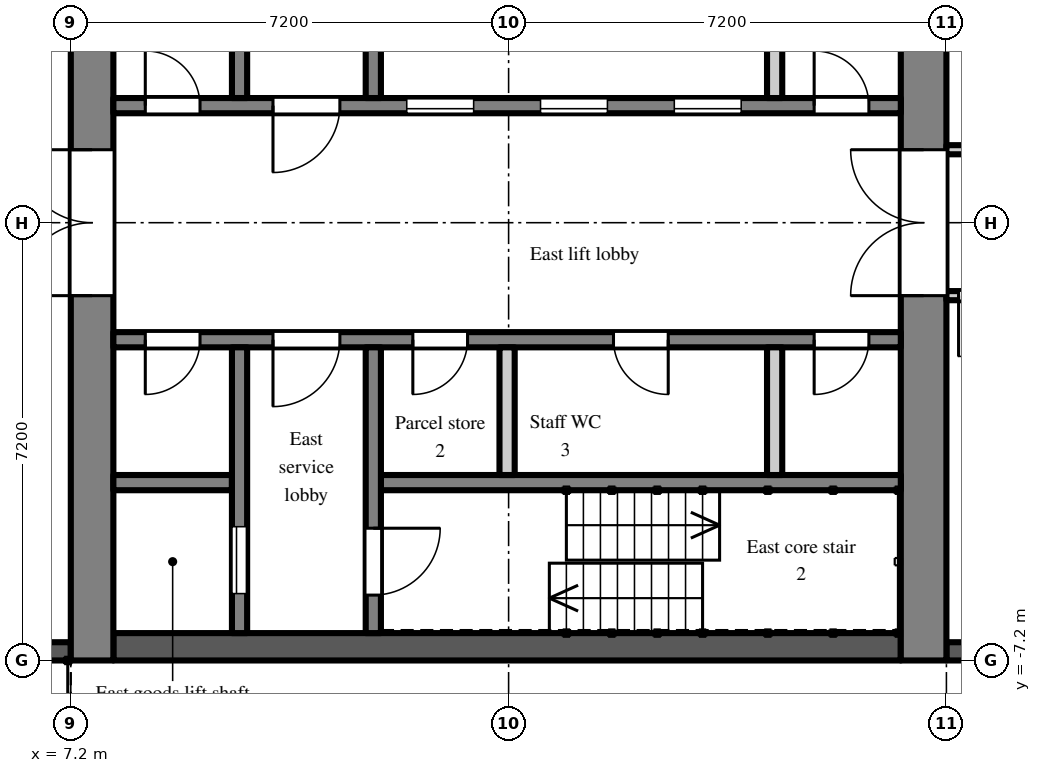
"""IFC4 building model, lengths in metres.
Left out: names, types, materials, properties, quantities, classifications, styles, units other than length and angle.
Written with IfcOpenShell. Run it as: python <this file> out.ifc"""

import sys

from ifc_helpers import new_model, si_unit, direction, frame, frame_2d, origin, place, context, subcontext, project, spatial, rectangle, extrude, element, fill, save


model = new_model("IFC4")
c1 = context("Model", 3, precision=1e-05, world=origin(), true_north=direction((0.0, 1.0)))
c2 = subcontext(c1, "Body", "Model", "MODEL_VIEW")
j1 = project(units=[si_unit("LENGTHUNIT", "METRE"), si_unit("PLANEANGLEUNIT", "RADIAN")], contexts=[c1])
p1 = place(None, origin())
s1 = spatial("IfcSite", under=j1, at=p1, CompositionType="ELEMENT")
p2 = place(p1, origin())
s2 = spatial("IfcBuilding", under=s1, at=p2, CompositionType="ELEMENT")
p3 = place(p2, frame((0.0, 0.0, 147.3)))
s3 = spatial("IfcBuildingStorey", under=s2, at=p3, CompositionType="ELEMENT", Elevation=147.3)
p4 = place(p3, frame((21.6, -7.05, 0.0), z_axis=(0.0, 0.0, 1.0), x_axis=(1.0, 0.0, 0.0)))
e1 = element("IfcWall", 1, at=p4, inside=s3, PredefinedType="SOLIDWALL", context=c2, shape_type="SweptSolid", body=[
    extrude(rectangle(XDim=2.7, YDim=0.3, at=frame_2d((1.35, 0.0))), origin(), (0.0, 0.0, 1.0), 2.2),
])
p5 = place(p4, frame((0.75, 0.0, 0.2)))
e2 = element("IfcOpeningElement", 2, at=p5, cuts=e1, PredefinedType="OPENING", context=c2, shape_type="SweptSolid", body=[
    extrude(rectangle(XDim=1.2, YDim=1.85, at=frame_2d((0.6, 0.925))), frame((0.0, 0.16, 0.0), z_axis=(0.0, -1.0, 0.0), x_axis=(1.0, 0.0, 0.0)), (0.0, 0.0, 1.0), 0.32),
])
p6 = place(p3, frame((4.2, -7.05, 0.0), z_axis=(0.0, 0.0, 1.0), x_axis=(1.0, 0.0, 0.0)))
e3 = element("IfcWall", 3, at=p6, inside=s3, PredefinedType="SOLIDWALL", context=c2, shape_type="SweptSolid", body=[
    extrude(rectangle(XDim=3.0, YDim=0.3, at=frame_2d((1.5, 0.0))), origin(), (0.0, 0.0, 1.0), 2.2),
])
p7 = place(p3, frame((7.55, -7.2, 0.0), z_axis=(0.0, 0.0, 1.0), x_axis=(0.0, 1.0, 0.0)))
e4 = element("IfcWall", 4, at=p7, inside=s3, PredefinedType="SHEAR", context=c2, shape_type="SweptSolid", body=[
    extrude(rectangle(XDim=14.4, YDim=0.7, at=frame_2d((7.2, 0.0))), origin(), (0.0, 0.0, 1.0), 2.6),
])
p8 = place(p7, frame((6.0, 0.0, 0.0)))
e5 = element("IfcOpeningElement", 5, at=p8, cuts=e4, PredefinedType="OPENING", context=c2, shape_type="SweptSolid", body=[
    extrude(rectangle(XDim=2.4, YDim=2.2, at=frame_2d((1.2, 1.1))), frame((0.0, 0.36, 0.0), z_axis=(0.0, -1.0, 0.0), x_axis=(1.0, 0.0, 0.0)), (0.0, 0.0, 1.0), 0.72),
])
p9 = place(p3, frame((21.225, -7.2, 0.0), z_axis=(0.0, 0.0, 1.0), x_axis=(0.0, 1.0, 0.0)))
e6 = element("IfcWall", 6, at=p9, inside=s3, PredefinedType="SHEAR", context=c2, shape_type="SweptSolid", body=[
    extrude(rectangle(XDim=14.4, YDim=0.75, at=frame_2d((7.2, 0.0))), origin(), (0.0, 0.0, 1.0), 2.6),
])
p10 = place(p9, frame((6.0, 0.0, 0.0)))
e7 = element("IfcOpeningElement", 7, at=p10, cuts=e6, PredefinedType="OPENING", context=c2, shape_type="SweptSolid", body=[
    extrude(rectangle(XDim=2.4, YDim=2.2, at=frame_2d((1.2, 1.1))), frame((0.0, 0.385, 0.0), z_axis=(0.0, -1.0, 0.0), x_axis=(1.0, 0.0, 0.0)), (0.0, 0.0, 1.0), 0.77),
])
p11 = place(p3, frame((7.9, 1.925, 0.0), z_axis=(0.0, 0.0, 1.0), x_axis=(1.0, 0.0, 0.0)))
e8 = element("IfcWall", 8, at=p11, inside=s3, PredefinedType="SHEAR", context=c2, shape_type="SweptSolid", body=[
    extrude(rectangle(XDim=12.95, YDim=0.25, at=frame_2d((6.475, 0.0))), origin(), (0.0, 0.0, 1.0), 2.6),
])
p12 = place(p11, frame((4.825, 0.0, 0.0)))
e9 = element("IfcOpeningElement", 9, at=p12, cuts=e8, PredefinedType="OPENING", context=c2, shape_type="SweptSolid", body=[
    extrude(rectangle(XDim=1.1, YDim=2.1, at=frame_2d((0.55, 1.05))), frame((0.0, 0.135, 0.0), z_axis=(0.0, -1.0, 0.0), x_axis=(1.0, 0.0, 0.0)), (0.0, 0.0, 1.0), 0.27),
])
p13 = place(p11, frame((7.025, 0.0, 0.0)))
e10 = element("IfcOpeningElement", 10, at=p13, cuts=e8, PredefinedType="OPENING", context=c2, shape_type="SweptSolid", body=[
    extrude(rectangle(XDim=1.1, YDim=2.1, at=frame_2d((0.55, 1.05))), frame((0.0, 0.135, 0.0), z_axis=(0.0, -1.0, 0.0), x_axis=(1.0, 0.0, 0.0)), (0.0, 0.0, 1.0), 0.27),
])
p14 = place(p11, frame((9.225, 0.0, 0.0)))
e11 = element("IfcOpeningElement", 11, at=p14, cuts=e8, PredefinedType="OPENING", context=c2, shape_type="SweptSolid", body=[
    extrude(rectangle(XDim=1.1, YDim=2.1, at=frame_2d((0.55, 1.05))), frame((0.0, 0.135, 0.0), z_axis=(0.0, -1.0, 0.0), x_axis=(1.0, 0.0, 0.0)), (0.0, 0.0, 1.0), 0.27),
])
p15 = place(p11, frame((0.525, 0.0, 0.0)))
e12 = element("IfcOpeningElement", 12, at=p15, cuts=e8, PredefinedType="OPENING", context=c2, shape_type="SweptSolid", body=[
    extrude(rectangle(XDim=0.9, YDim=2.1, at=frame_2d((0.45, 1.05))), frame((0.0, 0.135, 0.0), z_axis=(0.0, -1.0, 0.0), x_axis=(1.0, 0.0, 0.0)), (0.0, 0.0, 1.0), 0.27),
])
p16 = place(p11, frame((2.625, 0.0, 0.0)))
e13 = element("IfcOpeningElement", 13, at=p16, cuts=e8, PredefinedType="OPENING", context=c2, shape_type="SweptSolid", body=[
    extrude(rectangle(XDim=1.1, YDim=2.1, at=frame_2d((0.55, 1.05))), frame((0.0, 0.135, 0.0), z_axis=(0.0, -1.0, 0.0), x_axis=(1.0, 0.0, 0.0)), (0.0, 0.0, 1.0), 0.27),
])
p17 = place(p11, frame((11.525, 0.0, 0.0)))
e14 = element("IfcOpeningElement", 14, at=p17, cuts=e8, PredefinedType="OPENING", context=c2, shape_type="SweptSolid", body=[
    extrude(rectangle(XDim=0.9, YDim=2.1, at=frame_2d((0.45, 1.05))), frame((0.0, 0.135, 0.0), z_axis=(0.0, -1.0, 0.0), x_axis=(1.0, 0.0, 0.0)), (0.0, 0.0, 1.0), 0.27),
])
p18 = place(p3, frame((9.975, 2.05, 0.0), z_axis=(0.0, 0.0, 1.0), x_axis=(0.0, 1.0, 0.0)))
e15 = element("IfcWall", 15, at=p18, inside=s3, PredefinedType="SHEAR", context=c2, shape_type="SweptSolid", body=[
    extrude(rectangle(XDim=4.7, YDim=0.25, at=frame_2d((2.35, 0.0))), origin(), (0.0, 0.0, 1.0), 2.6),
])
p19 = place(p18, frame((2.95, 0.0, 0.0)))
e16 = element("IfcOpeningElement", 16, at=p19, cuts=e15, PredefinedType="OPENING", context=c2, shape_type="SweptSolid", body=[
    extrude(rectangle(XDim=1.1, YDim=2.1, at=frame_2d((0.55, 1.05))), frame((0.0, 0.135, 0.0), z_axis=(0.0, -1.0, 0.0), x_axis=(1.0, 0.0, 0.0)), (0.0, 0.0, 1.0), 0.27),
])
p20 = place(p3, frame((12.175, 2.05, 0.0), z_axis=(0.0, 0.0, 1.0), x_axis=(0.0, 1.0, 0.0)))
e17 = element("IfcWall", 17, at=p20, inside=s3, PredefinedType="SHEAR", context=c2, shape_type="SweptSolid", body=[
    extrude(rectangle(XDim=4.7, YDim=0.25, at=frame_2d((2.35, 0.0))), origin(), (0.0, 0.0, 1.0), 2.6),
])
p21 = place(p20, frame((2.975, 0.0, 0.0)))
e18 = element("IfcOpeningElement", 18, at=p21, cuts=e17, PredefinedType="OPENING", context=c2, shape_type="SweptSolid", body=[
    extrude(rectangle(XDim=1.1, YDim=2.1, at=frame_2d((0.55, 1.05))), frame((0.0, 0.135, 0.0), z_axis=(0.0, -1.0, 0.0), x_axis=(1.0, 0.0, 0.0)), (0.0, 0.0, 1.0), 0.27),
])
p22 = place(p3, frame((18.775, 2.05, 0.0), z_axis=(0.0, 0.0, 1.0), x_axis=(0.0, 1.0, 0.0)))
e19 = element("IfcWall", 19, at=p22, inside=s3, PredefinedType="PARTITIONING", context=c2, shape_type="SweptSolid", body=[
    extrude(rectangle(XDim=2.1, YDim=0.25, at=frame_2d((1.05, 0.0))), origin(), (0.0, 0.0, 1.0), 2.6),
])
p23 = place(p3, frame((7.9, -6.975, 0.0), z_axis=(0.0, 0.0, 1.0), x_axis=(1.0, 0.0, 0.0)))
e20 = element("IfcWall", 20, at=p23, inside=s3, PredefinedType="SHEAR", context=c2, shape_type="SweptSolid", body=[
    extrude(rectangle(XDim=12.95, YDim=0.45, at=frame_2d((6.475, 0.0))), origin(), (0.0, 0.0, 1.0), 2.6),
])
p24 = place(p3, frame((7.9, -1.925, 0.0), z_axis=(0.0, 0.0, 1.0), x_axis=(1.0, 0.0, 0.0)))
e21 = element("IfcWall", 21, at=p24, inside=s3, PredefinedType="SHEAR", context=c2, shape_type="SweptSolid", body=[
    extrude(rectangle(XDim=12.95, YDim=0.25, at=frame_2d((6.475, 0.0))), origin(), (0.0, 0.0, 1.0), 2.6),
])
p25 = place(p24, frame((0.525, 0.0, 0.0)))
e22 = element("IfcOpeningElement", 22, at=p25, cuts=e21, PredefinedType="OPENING", context=c2, shape_type="SweptSolid", body=[
    extrude(rectangle(XDim=0.9, YDim=2.1, at=frame_2d((0.45, 1.05))), frame((0.0, 0.135, 0.0), z_axis=(0.0, -1.0, 0.0), x_axis=(1.0, 0.0, 0.0)), (0.0, 0.0, 1.0), 0.27),
])
p26 = place(p24, frame((2.625, 0.0, 0.0)))
e23 = element("IfcOpeningElement", 23, at=p26, cuts=e21, PredefinedType="OPENING", context=c2, shape_type="SweptSolid", body=[
    extrude(rectangle(XDim=1.1, YDim=2.1, at=frame_2d((0.55, 1.05))), frame((0.0, 0.135, 0.0), z_axis=(0.0, -1.0, 0.0), x_axis=(1.0, 0.0, 0.0)), (0.0, 0.0, 1.0), 0.27),
])
p27 = place(p24, frame((4.925, 0.0, 0.0)))
e24 = element("IfcOpeningElement", 24, at=p27, cuts=e21, PredefinedType="OPENING", context=c2, shape_type="SweptSolid", body=[
    extrude(rectangle(XDim=0.9, YDim=2.1, at=frame_2d((0.45, 1.05))), frame((0.0, 0.135, 0.0), z_axis=(0.0, -1.0, 0.0), x_axis=(1.0, 0.0, 0.0)), (0.0, 0.0, 1.0), 0.27),
])
p28 = place(p24, frame((8.225, 0.0, 0.0)))
e25 = element("IfcOpeningElement", 25, at=p28, cuts=e21, PredefinedType="OPENING", context=c2, shape_type="SweptSolid", body=[
    extrude(rectangle(XDim=0.9, YDim=2.1, at=frame_2d((0.45, 1.05))), frame((0.0, 0.135, 0.0), z_axis=(0.0, -1.0, 0.0), x_axis=(1.0, 0.0, 0.0)), (0.0, 0.0, 1.0), 0.27),
])
p29 = place(p24, frame((11.525, 0.0, 0.0)))
e26 = element("IfcOpeningElement", 26, at=p29, cuts=e21, PredefinedType="OPENING", context=c2, shape_type="SweptSolid", body=[
    extrude(rectangle(XDim=0.9, YDim=2.1, at=frame_2d((0.45, 1.05))), frame((0.0, 0.135, 0.0), z_axis=(0.0, -1.0, 0.0), x_axis=(1.0, 0.0, 0.0)), (0.0, 0.0, 1.0), 0.27),
])
p30 = place(p3, frame((7.9, -4.275, 0.0), z_axis=(0.0, 0.0, 1.0), x_axis=(1.0, 0.0, 0.0)))
e27 = element("IfcWall", 27, at=p30, inside=s3, PredefinedType="SHEAR", context=c2, shape_type="SweptSolid", body=[
    extrude(rectangle(XDim=1.95, YDim=0.25, at=frame_2d((0.975, 0.0))), origin(), (0.0, 0.0, 1.0), 2.6),
])
p31 = place(p3, frame((12.3, -4.275, 0.0), z_axis=(0.0, 0.0, 1.0), x_axis=(1.0, 0.0, 0.0)))
e28 = element("IfcWall", 28, at=p31, inside=s3, PredefinedType="SHEAR", context=c2, shape_type="SweptSolid", body=[
    extrude(rectangle(XDim=8.55, YDim=0.25, at=frame_2d((4.275, 0.0))), origin(), (0.0, 0.0, 1.0), 2.6),
])
p32 = place(p3, frame((9.975, -2.05, 0.0), z_axis=(0.0, 0.0, 1.0), x_axis=(0.0, -1.0, 0.0)))
e29 = element("IfcWall", 29, at=p32, inside=s3, PredefinedType="SHEAR", context=c2, shape_type="SweptSolid", body=[
    extrude(rectangle(XDim=4.7, YDim=0.25, at=frame_2d((2.35, 0.0))), origin(), (0.0, 0.0, 1.0), 2.6),
])
p33 = place(p32, frame((2.95, 0.0, 0.0)))
e30 = element("IfcOpeningElement", 30, at=p33, cuts=e29, PredefinedType="OPENING", context=c2, shape_type="SweptSolid", body=[
    extrude(rectangle(XDim=1.1, YDim=2.1, at=frame_2d((0.55, 1.05))), frame((0.0, 0.135, 0.0), z_axis=(0.0, -1.0, 0.0), x_axis=(1.0, 0.0, 0.0)), (0.0, 0.0, 1.0), 0.27),
])
p34 = place(p3, frame((12.175, -2.05, 0.0), z_axis=(0.0, 0.0, 1.0), x_axis=(0.0, -1.0, 0.0)))
e31 = element("IfcWall", 31, at=p34, inside=s3, PredefinedType="SHEAR", context=c2, shape_type="SweptSolid", body=[
    extrude(rectangle(XDim=4.7, YDim=0.25, at=frame_2d((2.35, 0.0))), origin(), (0.0, 0.0, 1.0), 2.6),
])
p35 = place(p34, frame((2.975, 0.0, 0.0)))
e32 = element("IfcOpeningElement", 32, at=p35, cuts=e31, PredefinedType="OPENING", context=c2, shape_type="SweptSolid", body=[
    extrude(rectangle(XDim=1.1, YDim=2.1, at=frame_2d((0.55, 1.05))), frame((0.0, 0.135, 0.0), z_axis=(0.0, -1.0, 0.0), x_axis=(1.0, 0.0, 0.0)), (0.0, 0.0, 1.0), 0.27),
])
for number, where, z_axis, x_axis in (
    (33, (14.375, -2.05, 0.0), (0.0, 0.0, 1.0), (0.0, -1.0, 0.0)),
    (34, (18.775, -2.05, 0.0), (0.0, 0.0, 1.0), (0.0, -1.0, 0.0)),
):
    element("IfcWall", number, at=place(p3, frame(where, z_axis=z_axis, x_axis=x_axis)), inside=s3, PredefinedType="PARTITIONING", context=c2, shape_type="SweptSolid", body=[
        extrude(rectangle(XDim=2.1, YDim=0.25, at=frame_2d((1.05, 0.0))), origin(), (0.0, 0.0, 1.0), 2.6),
    ])
p36 = place(p3, frame((21.6, -1.2, 0.0), z_axis=(0.0, 0.0, 1.0), x_axis=(1.0, 0.0, 0.0)))
e35 = element("IfcWall", 35, at=p36, inside=s3, PredefinedType="PARTITIONING", context=c2, shape_type="SweptSolid", body=[
    extrude(rectangle(XDim=14.9, YDim=0.15, at=frame_2d((7.45, 0.0))), origin(), (0.0, 0.0, 1.0), 2.6),
])
p37 = place(p36, frame((0.2, 0.0, 0.0)))
e36 = element("IfcOpeningElement", 36, at=p37, cuts=e35, PredefinedType="OPENING", context=c2, shape_type="SweptSolid", body=[
    extrude(rectangle(XDim=1.0, YDim=2.1, at=frame_2d((0.5, 1.05))), frame((0.0, 0.085, 0.0), z_axis=(0.0, -1.0, 0.0), x_axis=(1.0, 0.0, 0.0)), (0.0, 0.0, 1.0), 0.17),
])
p38 = place(p36, frame((6.3, 0.0, 0.0)))
e37 = element("IfcOpeningElement", 37, at=p38, cuts=e35, PredefinedType="OPENING", context=c2, shape_type="SweptSolid", body=[
    extrude(rectangle(XDim=1.8, YDim=2.1, at=frame_2d((0.9, 1.05))), frame((0.0, 0.085, 0.0), z_axis=(0.0, -1.0, 0.0), x_axis=(1.0, 0.0, 0.0)), (0.0, 0.0, 1.0), 0.17),
])
p39 = place(p36, frame((11.95, 0.0, 0.0)))
e38 = element("IfcOpeningElement", 38, at=p39, cuts=e35, PredefinedType="OPENING", context=c2, shape_type="SweptSolid", body=[
    extrude(rectangle(XDim=1.8, YDim=2.1, at=frame_2d((0.9, 1.05))), frame((0.0, 0.085, 0.0), z_axis=(0.0, -1.0, 0.0), x_axis=(1.0, 0.0, 0.0)), (0.0, 0.0, 1.0), 0.17),
])
p40 = place(p3, frame((21.6, 1.2, 0.0), z_axis=(0.0, 0.0, 1.0), x_axis=(1.0, 0.0, 0.0)))
e39 = element("IfcWall", 39, at=p40, inside=s3, PredefinedType="PARTITIONING", context=c2, shape_type="SweptSolid", body=[
    extrude(rectangle(XDim=14.9, YDim=0.15, at=frame_2d((7.45, 0.0))), origin(), (0.0, 0.0, 1.0), 2.6),
])
p41 = place(p40, frame((0.45, 0.0, 0.0)))
e40 = element("IfcOpeningElement", 40, at=p41, cuts=e39, PredefinedType="OPENING", context=c2, shape_type="SweptSolid", body=[
    extrude(rectangle(XDim=0.9, YDim=2.1, at=frame_2d((0.45, 1.05))), frame((0.0, 0.085, 0.0), z_axis=(0.0, -1.0, 0.0), x_axis=(1.0, 0.0, 0.0)), (0.0, 0.0, 1.0), 0.17),
])
p42 = place(p40, frame((2.25, 0.0, 0.0)))
e41 = element("IfcOpeningElement", 41, at=p42, cuts=e39, PredefinedType="OPENING", context=c2, shape_type="SweptSolid", body=[
    extrude(rectangle(XDim=0.9, YDim=2.1, at=frame_2d((0.45, 1.05))), frame((0.0, 0.085, 0.0), z_axis=(0.0, -1.0, 0.0), x_axis=(1.0, 0.0, 0.0)), (0.0, 0.0, 1.0), 0.17),
])
p43 = place(p40, frame((4.05, 0.0, 0.0)))
e42 = element("IfcOpeningElement", 42, at=p43, cuts=e39, PredefinedType="OPENING", context=c2, shape_type="SweptSolid", body=[
    extrude(rectangle(XDim=0.9, YDim=2.1, at=frame_2d((0.45, 1.05))), frame((0.0, 0.085, 0.0), z_axis=(0.0, -1.0, 0.0), x_axis=(1.0, 0.0, 0.0)), (0.0, 0.0, 1.0), 0.17),
])
p44 = place(p40, frame((5.85, 0.0, 0.0)))
e43 = element("IfcOpeningElement", 43, at=p44, cuts=e39, PredefinedType="OPENING", context=c2, shape_type="SweptSolid", body=[
    extrude(rectangle(XDim=0.9, YDim=2.1, at=frame_2d((0.45, 1.05))), frame((0.0, 0.085, 0.0), z_axis=(0.0, -1.0, 0.0), x_axis=(1.0, 0.0, 0.0)), (0.0, 0.0, 1.0), 0.17),
])
p45 = place(p40, frame((7.8, 0.0, 0.0)))
e44 = element("IfcOpeningElement", 44, at=p45, cuts=e39, PredefinedType="OPENING", context=c2, shape_type="SweptSolid", body=[
    extrude(rectangle(XDim=1.0, YDim=2.1, at=frame_2d((0.5, 1.05))), frame((0.0, 0.085, 0.0), z_axis=(0.0, -1.0, 0.0), x_axis=(1.0, 0.0, 0.0)), (0.0, 0.0, 1.0), 0.17),
])
p46 = place(p40, frame((11.95, 0.0, 0.0)))
e45 = element("IfcOpeningElement", 45, at=p46, cuts=e39, PredefinedType="OPENING", context=c2, shape_type="SweptSolid", body=[
    extrude(rectangle(XDim=1.8, YDim=2.1, at=frame_2d((0.9, 1.05))), frame((0.0, 0.085, 0.0), z_axis=(0.0, -1.0, 0.0), x_axis=(1.0, 0.0, 0.0)), (0.0, 0.0, 1.0), 0.17),
])
p47 = place(p12, origin())
e46 = element("IfcDoor", 46, at=p47, inside=s3, OperationType="SLIDING_TO_LEFT", PredefinedType="DOOR", context=c2, shape_type="SweptSolid", body=[
    extrude(rectangle(XDim=1.1, YDim=2.1, at=frame_2d((0.55, 1.05))), frame((0.0, 0.025, 0.0), z_axis=(0.0, -1.0, 0.0), x_axis=(1.0, 0.0, 0.0)), (0.0, 0.0, 1.0), 0.05),
])
fill(e9, e46)
p48 = place(p13, origin())
e47 = element("IfcDoor", 47, at=p48, inside=s3, OperationType="SLIDING_TO_LEFT", PredefinedType="DOOR", context=c2, shape_type="SweptSolid", body=[
    extrude(rectangle(XDim=1.1, YDim=2.1, at=frame_2d((0.55, 1.05))), frame((0.0, 0.025, 0.0), z_axis=(0.0, -1.0, 0.0), x_axis=(1.0, 0.0, 0.0)), (0.0, 0.0, 1.0), 0.05),
])
fill(e10, e47)
p49 = place(p14, origin())
e48 = element("IfcDoor", 48, at=p49, inside=s3, OperationType="SLIDING_TO_LEFT", PredefinedType="DOOR", context=c2, shape_type="SweptSolid", body=[
    extrude(rectangle(XDim=1.1, YDim=2.1, at=frame_2d((0.55, 1.05))), frame((0.0, 0.025, 0.0), z_axis=(0.0, -1.0, 0.0), x_axis=(1.0, 0.0, 0.0)), (0.0, 0.0, 1.0), 0.05),
])
fill(e11, e48)
p50 = place(p33, origin())
e49 = element("IfcDoor", 49, at=p50, inside=s3, OperationType="SLIDING_TO_LEFT", PredefinedType="DOOR", context=c2, shape_type="SweptSolid", body=[
    extrude(rectangle(XDim=1.1, YDim=2.1, at=frame_2d((0.55, 1.05))), frame((0.0, 0.025, 0.0), z_axis=(0.0, -1.0, 0.0), x_axis=(1.0, 0.0, 0.0)), (0.0, 0.0, 1.0), 0.05),
])
fill(e30, e49)
p51 = place(p35, origin())
e50 = element("IfcDoor", 50, at=p51, inside=s3, OperationType="SINGLE_SWING_LEFT", PredefinedType="DOOR", context=c2, shape_type="SweptSolid", body=[
    extrude(rectangle(XDim=1.1, YDim=2.1, at=frame_2d((0.55, 1.05))), frame((0.0, 0.025, 0.0), z_axis=(0.0, -1.0, 0.0), x_axis=(1.0, 0.0, 0.0)), (0.0, 0.0, 1.0), 0.05),
])
fill(e32, e50)
p52 = place(p15, origin())
e51 = element("IfcDoor", 51, at=p52, inside=s3, OperationType="SINGLE_SWING_LEFT", PredefinedType="DOOR", context=c2, shape_type="SweptSolid", body=[
    extrude(rectangle(XDim=0.9, YDim=2.1, at=frame_2d((0.45, 1.05))), frame((0.0, 0.025, 0.0), z_axis=(0.0, -1.0, 0.0), x_axis=(1.0, 0.0, 0.0)), (0.0, 0.0, 1.0), 0.05),
])
fill(e12, e51)
p53 = place(p25, frame((0.9, 0.0, 0.0), z_axis=(0.0, 0.0, 1.0), x_axis=(-1.0, 0.0, 0.0)))
e52 = element("IfcDoor", 52, at=p53, inside=s3, OperationType="SINGLE_SWING_RIGHT", PredefinedType="DOOR", context=c2, shape_type="SweptSolid", body=[
    extrude(rectangle(XDim=0.9, YDim=2.1, at=frame_2d((0.45, 1.05))), frame((0.0, 0.025, 0.0), z_axis=(0.0, -1.0, 0.0), x_axis=(1.0, 0.0, 0.0)), (0.0, 0.0, 1.0), 0.05),
])
fill(e22, e52)
p54 = place(p16, frame((1.1, 0.0, 0.0), z_axis=(0.0, 0.0, 1.0), x_axis=(-1.0, 0.0, 0.0)))
e53 = element("IfcDoor", 53, at=p54, inside=s3, OperationType="SINGLE_SWING_RIGHT", PredefinedType="DOOR", context=c2, shape_type="SweptSolid", body=[
    extrude(rectangle(XDim=1.1, YDim=2.1, at=frame_2d((0.55, 1.05))), frame((0.0, 0.025, 0.0), z_axis=(0.0, -1.0, 0.0), x_axis=(1.0, 0.0, 0.0)), (0.0, 0.0, 1.0), 0.05),
])
fill(e13, e53)
p55 = place(p26, frame((1.1, 0.0, 0.0), z_axis=(0.0, 0.0, 1.0), x_axis=(-1.0, 0.0, 0.0)))
e54 = element("IfcDoor", 54, at=p55, inside=s3, OperationType="SINGLE_SWING_RIGHT", PredefinedType="DOOR", context=c2, shape_type="SweptSolid", body=[
    extrude(rectangle(XDim=1.1, YDim=2.1, at=frame_2d((0.55, 1.05))), frame((0.0, 0.025, 0.0), z_axis=(0.0, -1.0, 0.0), x_axis=(1.0, 0.0, 0.0)), (0.0, 0.0, 1.0), 0.05),
])
fill(e23, e54)
p56 = place(p8, origin())
e55 = element("IfcDoor", 55, at=p56, inside=s3, OperationType="DOUBLE_DOOR_DOUBLE_SWING", PredefinedType="DOOR", context=c2, shape_type="SweptSolid", body=[
    extrude(rectangle(XDim=2.4, YDim=2.2, at=frame_2d((1.2, 1.1))), frame((0.0, 0.025, 0.0), z_axis=(0.0, -1.0, 0.0), x_axis=(1.0, 0.0, 0.0)), (0.0, 0.0, 1.0), 0.05),
])
fill(e5, e55)
p57 = place(p10, origin())
e56 = element("IfcDoor", 56, at=p57, inside=s3, OperationType="DOUBLE_DOOR_DOUBLE_SWING", PredefinedType="DOOR", context=c2, shape_type="SweptSolid", body=[
    extrude(rectangle(XDim=2.4, YDim=2.2, at=frame_2d((1.2, 1.1))), frame((0.0, 0.025, 0.0), z_axis=(0.0, -1.0, 0.0), x_axis=(1.0, 0.0, 0.0)), (0.0, 0.0, 1.0), 0.05),
])
fill(e7, e56)
p58 = place(p17, origin())
e57 = element("IfcDoor", 57, at=p58, inside=s3, OperationType="SINGLE_SWING_LEFT", PredefinedType="DOOR", context=c2, shape_type="SweptSolid", body=[
    extrude(rectangle(XDim=0.9, YDim=2.1, at=frame_2d((0.45, 1.05))), frame((0.0, 0.025, 0.0), z_axis=(0.0, -1.0, 0.0), x_axis=(1.0, 0.0, 0.0)), (0.0, 0.0, 1.0), 0.05),
])
fill(e14, e57)
p59 = place(p27, frame((0.9, 0.0, 0.0), z_axis=(0.0, 0.0, 1.0), x_axis=(-1.0, 0.0, 0.0)))
e58 = element("IfcDoor", 58, at=p59, inside=s3, OperationType="SINGLE_SWING_RIGHT", PredefinedType="DOOR", context=c2, shape_type="SweptSolid", body=[
    extrude(rectangle(XDim=0.9, YDim=2.1, at=frame_2d((0.45, 1.05))), frame((0.0, 0.025, 0.0), z_axis=(0.0, -1.0, 0.0), x_axis=(1.0, 0.0, 0.0)), (0.0, 0.0, 1.0), 0.05),
])
fill(e24, e58)
p60 = place(p28, frame((0.9, 0.0, 0.0), z_axis=(0.0, 0.0, 1.0), x_axis=(-1.0, 0.0, 0.0)))
e59 = element("IfcDoor", 59, at=p60, inside=s3, OperationType="SINGLE_SWING_LEFT", PredefinedType="DOOR", context=c2, shape_type="SweptSolid", body=[
    extrude(rectangle(XDim=0.9, YDim=2.1, at=frame_2d((0.45, 1.05))), frame((0.0, 0.025, 0.0), z_axis=(0.0, -1.0, 0.0), x_axis=(1.0, 0.0, 0.0)), (0.0, 0.0, 1.0), 0.05),
])
fill(e25, e59)
p61 = place(p29, frame((0.9, 0.0, 0.0), z_axis=(0.0, 0.0, 1.0), x_axis=(-1.0, 0.0, 0.0)))
e60 = element("IfcDoor", 60, at=p61, inside=s3, OperationType="SINGLE_SWING_RIGHT", PredefinedType="DOOR", context=c2, shape_type="SweptSolid", body=[
    extrude(rectangle(XDim=0.9, YDim=2.1, at=frame_2d((0.45, 1.05))), frame((0.0, 0.025, 0.0), z_axis=(0.0, -1.0, 0.0), x_axis=(1.0, 0.0, 0.0)), (0.0, 0.0, 1.0), 0.05),
])
fill(e26, e60)
p62 = place(p37, frame((1.0, 0.0, 0.0), z_axis=(0.0, 0.0, 1.0), x_axis=(-1.0, 0.0, 0.0)))
e61 = element("IfcDoor", 61, at=p62, inside=s3, OperationType="SINGLE_SWING_RIGHT", PredefinedType="DOOR", context=c2, shape_type="SweptSolid", body=[
    extrude(rectangle(XDim=1.0, YDim=2.1, at=frame_2d((0.5, 1.05))), frame((0.0, 0.025, 0.0), z_axis=(0.0, -1.0, 0.0), x_axis=(1.0, 0.0, 0.0)), (0.0, 0.0, 1.0), 0.05),
])
fill(e36, e61)
save(model, sys.argv[1])
